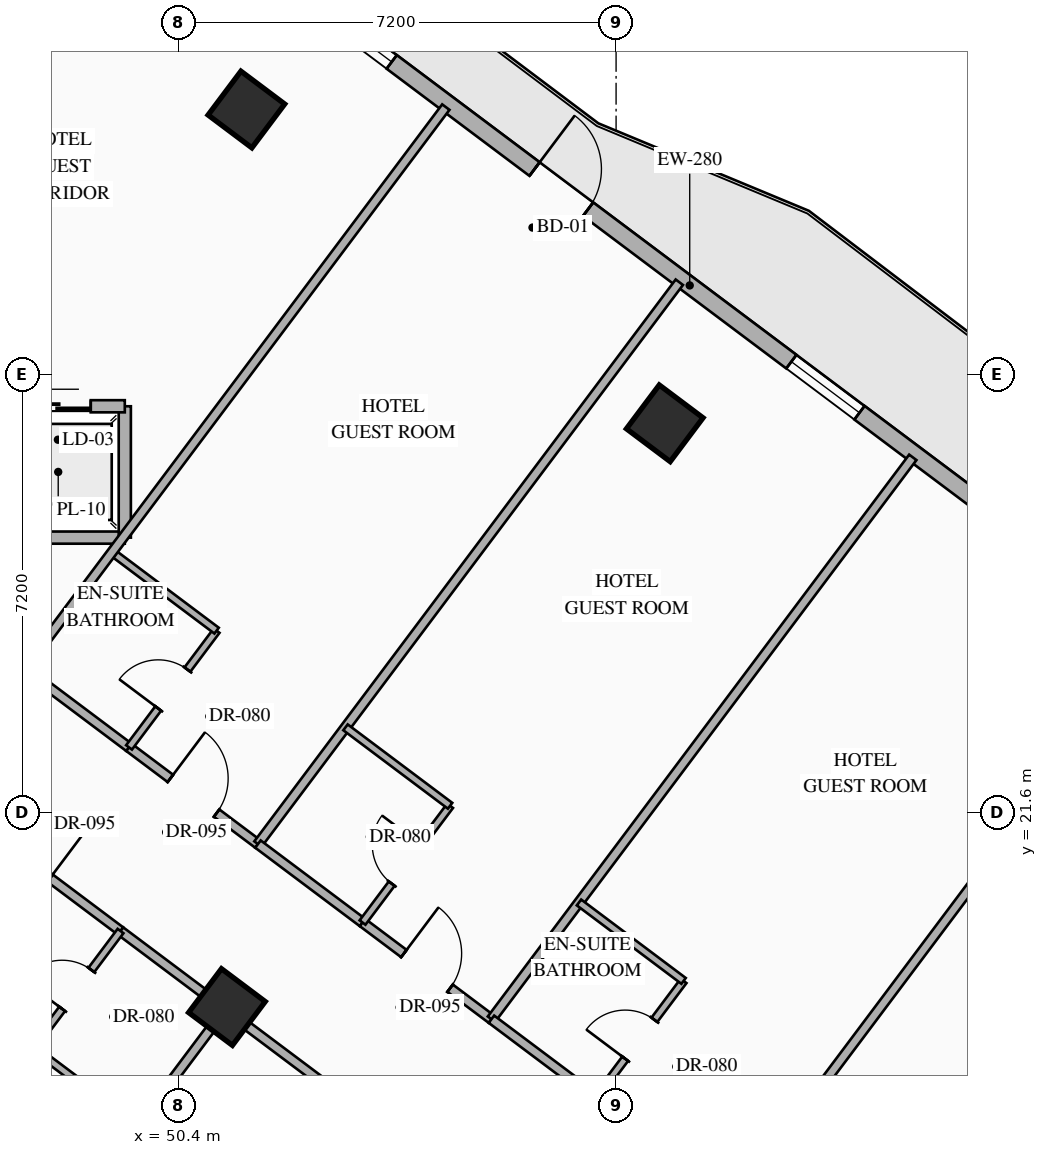
"""IFC4 building model, lengths in metres.
Left out: names, types, materials, properties, quantities, classifications, styles, units other than length and angle.
Written with IfcOpenShell. Run it as: python <this file> out.ifc"""

import sys

from ifc_helpers import new_model, si_unit, direction, frame, frame_2d, origin, origin_2d, place, context, subcontext, project, spatial, rectangle, hollow_rectangle, extrude, element, fill, save


model = new_model("IFC4")
c1 = context("Model", 3, precision=1e-05, world=origin(), true_north=direction((0.0, 1.0)))
c2 = subcontext(c1, "Body", "Model", "MODEL_VIEW")
j1 = project(units=[si_unit("LENGTHUNIT", "METRE"), si_unit("PLANEANGLEUNIT", "RADIAN")], contexts=[c1])
p1 = place(None, origin())
s1 = spatial("IfcSite", under=j1, at=p1, CompositionType="ELEMENT")
p2 = place(p1, origin())
s2 = spatial("IfcBuilding", under=s1, at=p2, CompositionType="ELEMENT")
p3 = place(p2, frame((0.0, 0.0, 81.3)))
s3 = spatial("IfcBuildingStorey", under=s2, at=p3, CompositionType="ELEMENT", Elevation=81.3)
for number, where, z_axis, x_axis in (
    (1, (51.52, 33.16, 0.0), (0.0, 0.0, 1.0), (0.8, -0.6, 0.0)),
    (2, (58.4, 28.0, 0.0), (0.0, 0.0, 1.0), (0.8, -0.6, 0.0)),
    (3, (51.2, 18.4, 0.0), (0.0, 0.0, 1.0), (0.8, -0.6, 0.0)),
):
    element("IfcColumn", number, at=place(p3, frame(where, z_axis=z_axis, x_axis=x_axis)), inside=s3, PredefinedType="COLUMN", context=c2, shape_type="SweptSolid", body=[
        extrude(hollow_rectangle(XDim=0.9, YDim=0.9, WallThickness=0.036, at=origin_2d()), origin(), (0.0, 0.0, 1.0), 3.35),
    ])
p4 = place(p3, frame((44.86, 40.73, 0.0), z_axis=(0.0, 0.0, 1.0), x_axis=(0.800006902154, -0.599990797017, 0.0)))
e4 = element("IfcWall", 4, at=p4, inside=s3, PredefinedType="STANDARD", context=c2, shape_type="SweptSolid", body=[
    extrude(rectangle(XDim=29.712, YDim=0.28, at=frame_2d((14.856, 0.0))), origin(), (0.0, 0.0, 1.0), 3.13),
])
p5 = place(p4, frame((14.249, 0.0, 0.0)))
e5 = element("IfcOpeningElement", 5, at=p5, cuts=e4, PredefinedType="OPENING", context=c2, shape_type="SweptSolid", body=[
    extrude(rectangle(XDim=1.1, YDim=2.2, at=frame_2d((0.55, 1.1))), frame((0.0, 0.15, 0.0), z_axis=(0.0, -1.0, 0.0), x_axis=(1.0, 0.0, 0.0)), (0.0, 0.0, 1.0), 0.3),
])
p6 = place(p4, frame((1.612, 0.0, 0.85)))
e6 = element("IfcOpeningElement", 6, at=p6, cuts=e4, PredefinedType="OPENING", context=c2, shape_type="SweptSolid", body=[
    extrude(rectangle(XDim=1.4, YDim=1.8, at=frame_2d((0.7, 0.9))), frame((0.0, 0.15, 0.0), z_axis=(0.0, -1.0, 0.0), x_axis=(1.0, 0.0, 0.0)), (0.0, 0.0, 1.0), 0.3),
])
p7 = place(p4, frame((5.667, 0.0, 0.85)))
e7 = element("IfcOpeningElement", 7, at=p7, cuts=e4, PredefinedType="OPENING", context=c2, shape_type="SweptSolid", body=[
    extrude(rectangle(XDim=1.4, YDim=1.8, at=frame_2d((0.7, 0.9))), frame((0.0, 0.15, 0.0), z_axis=(0.0, -1.0, 0.0), x_axis=(1.0, 0.0, 0.0)), (0.0, 0.0, 1.0), 0.3),
])
p8 = place(p4, frame((9.912, 0.0, 0.85)))
e8 = element("IfcOpeningElement", 8, at=p8, cuts=e4, PredefinedType="OPENING", context=c2, shape_type="SweptSolid", body=[
    extrude(rectangle(XDim=1.4, YDim=1.8, at=frame_2d((0.7, 0.9))), frame((0.0, 0.15, 0.0), z_axis=(0.0, -1.0, 0.0), x_axis=(1.0, 0.0, 0.0)), (0.0, 0.0, 1.0), 0.3),
])
p9 = place(p4, frame((19.528, 0.0, 0.85)))
e9 = element("IfcOpeningElement", 9, at=p9, cuts=e4, PredefinedType="OPENING", context=c2, shape_type="SweptSolid", body=[
    extrude(rectangle(XDim=1.4, YDim=1.8, at=frame_2d((0.7, 0.9))), frame((0.0, 0.15, 0.0), z_axis=(0.0, -1.0, 0.0), x_axis=(1.0, 0.0, 0.0)), (0.0, 0.0, 1.0), 0.3),
])
p10 = place(p4, frame((23.451, 0.0, 0.85)))
e10 = element("IfcOpeningElement", 10, at=p10, cuts=e4, PredefinedType="OPENING", context=c2, shape_type="SweptSolid", body=[
    extrude(rectangle(XDim=1.4, YDim=1.8, at=frame_2d((0.7, 0.9))), frame((0.0, 0.15, 0.0), z_axis=(0.0, -1.0, 0.0), x_axis=(1.0, 0.0, 0.0)), (0.0, 0.0, 1.0), 0.3),
])
p11 = place(p4, frame((27.852, 0.0, 0.85)))
e11 = element("IfcOpeningElement", 11, at=p11, cuts=e4, PredefinedType="OPENING", context=c2, shape_type="SweptSolid", body=[
    extrude(rectangle(XDim=1.4, YDim=1.8, at=frame_2d((0.7, 0.9))), frame((0.0, 0.15, 0.0), z_axis=(0.0, -1.0, 0.0), x_axis=(1.0, 0.0, 0.0)), (0.0, 0.0, 1.0), 0.3),
])
p12 = place(p3, frame((53.318, 2.487, 0.0), z_axis=(0.0, 0.0, 1.0), x_axis=(-0.800004174678, 0.599994433723, 0.0)))
e12 = element("IfcWall", 12, at=p12, inside=s3, PredefinedType="STANDARD", context=c2, shape_type="SweptSolid", body=[
    extrude(rectangle(XDim=35.089, YDim=0.28, at=frame_2d((17.544, 0.0))), origin(), (0.0, 0.0, 1.0), 3.13),
])
p13 = place(p12, frame((1.931, 0.0, 0.85)))
e13 = element("IfcOpeningElement", 13, at=p13, cuts=e12, PredefinedType="OPENING", context=c2, shape_type="SweptSolid", body=[
    extrude(rectangle(XDim=1.4, YDim=1.8, at=frame_2d((0.7, 0.9))), frame((0.0, 0.15, 0.0), z_axis=(0.0, -1.0, 0.0), x_axis=(1.0, 0.0, 0.0)), (0.0, 0.0, 1.0), 0.3),
])
p14 = place(p12, frame((6.819, 0.0, 0.85)))
e14 = element("IfcOpeningElement", 14, at=p14, cuts=e12, PredefinedType="OPENING", context=c2, shape_type="SweptSolid", body=[
    extrude(rectangle(XDim=1.4, YDim=1.8, at=frame_2d((0.7, 0.9))), frame((0.0, 0.15, 0.0), z_axis=(0.0, -1.0, 0.0), x_axis=(1.0, 0.0, 0.0)), (0.0, 0.0, 1.0), 0.3),
])
p15 = place(p12, frame((11.832, 0.0, 0.85)))
e15 = element("IfcOpeningElement", 15, at=p15, cuts=e12, PredefinedType="OPENING", context=c2, shape_type="SweptSolid", body=[
    extrude(rectangle(XDim=1.4, YDim=1.8, at=frame_2d((0.7, 0.9))), frame((0.0, 0.15, 0.0), z_axis=(0.0, -1.0, 0.0), x_axis=(1.0, 0.0, 0.0)), (0.0, 0.0, 1.0), 0.3),
])
p16 = place(p12, frame((17.647, 0.0, 0.85)))
e16 = element("IfcOpeningElement", 16, at=p16, cuts=e12, PredefinedType="OPENING", context=c2, shape_type="SweptSolid", body=[
    extrude(rectangle(XDim=1.4, YDim=1.8, at=frame_2d((0.7, 0.9))), frame((0.0, 0.15, 0.0), z_axis=(0.0, -1.0, 0.0), x_axis=(1.0, 0.0, 0.0)), (0.0, 0.0, 1.0), 0.3),
])
p17 = place(p12, frame((21.857, 0.0, 0.85)))
e17 = element("IfcOpeningElement", 17, at=p17, cuts=e12, PredefinedType="OPENING", context=c2, shape_type="SweptSolid", body=[
    extrude(rectangle(XDim=1.4, YDim=1.8, at=frame_2d((0.7, 0.9))), frame((0.0, 0.15, 0.0), z_axis=(0.0, -1.0, 0.0), x_axis=(1.0, 0.0, 0.0)), (0.0, 0.0, 1.0), 0.3),
])
p18 = place(p12, frame((26.87, 0.0, 0.85)))
e18 = element("IfcOpeningElement", 18, at=p18, cuts=e12, PredefinedType="OPENING", context=c2, shape_type="SweptSolid", body=[
    extrude(rectangle(XDim=1.4, YDim=1.8, at=frame_2d((0.7, 0.9))), frame((0.0, 0.15, 0.0), z_axis=(0.0, -1.0, 0.0), x_axis=(1.0, 0.0, 0.0)), (0.0, 0.0, 1.0), 0.3),
])
p19 = place(p12, frame((31.757, 0.0, 0.85)))
e19 = element("IfcOpeningElement", 19, at=p19, cuts=e12, PredefinedType="OPENING", context=c2, shape_type="SweptSolid", body=[
    extrude(rectangle(XDim=1.4, YDim=1.8, at=frame_2d((0.7, 0.9))), frame((0.0, 0.15, 0.0), z_axis=(0.0, -1.0, 0.0), x_axis=(1.0, 0.0, 0.0)), (0.0, 0.0, 1.0), 0.3),
])
p20 = place(p3, frame((45.12, 26.12, 0.0), z_axis=(0.0, 0.0, 1.0), x_axis=(1.0, 0.0, 0.0)))
e20 = element("IfcWall", 20, at=p20, inside=s3, PredefinedType="STANDARD", context=c2, shape_type="SweptSolid", body=[
    extrude(rectangle(XDim=4.4, YDim=0.2, at=frame_2d((2.2, 0.0))), origin(), (0.0, 0.0, 1.0), 3.13),
])
p21 = place(p3, frame((49.52, 26.12, 0.0), z_axis=(0.0, 0.0, 1.0), x_axis=(0.0, 1.0, 0.0)))
e21 = element("IfcWall", 21, at=p21, inside=s3, PredefinedType="STANDARD", context=c2, shape_type="SweptSolid", body=[
    extrude(rectangle(XDim=2.16, YDim=0.2, at=frame_2d((1.08, 0.0))), origin(), (0.0, 0.0, 1.0), 3.13),
])
p22 = place(p3, frame((45.12, 28.28, 0.0), z_axis=(0.0, 0.0, 1.0), x_axis=(1.0, 0.0, 0.0)))
e22 = element("IfcWall", 22, at=p22, inside=s3, PredefinedType="STANDARD", context=c2, shape_type="SweptSolid", body=[
    extrude(rectangle(XDim=4.4, YDim=0.2, at=frame_2d((2.2, 0.0))), origin(), (0.0, 0.0, 1.0), 3.13),
])
p23 = place(p22, frame((0.56, 0.0, 0.0)))
e23 = element("IfcOpeningElement", 23, at=p23, cuts=e22, PredefinedType="OPENING", context=c2, shape_type="SweptSolid", body=[
    extrude(rectangle(XDim=1.08, YDim=2.15, at=frame_2d((0.54, 1.075))), frame((0.0, 0.11, 0.0), z_axis=(0.0, -1.0, 0.0), x_axis=(1.0, 0.0, 0.0)), (0.0, 0.0, 1.0), 0.22),
])
p24 = place(p22, frame((2.76, 0.0, 0.0)))
e24 = element("IfcOpeningElement", 24, at=p24, cuts=e22, PredefinedType="OPENING", context=c2, shape_type="SweptSolid", body=[
    extrude(rectangle(XDim=1.08, YDim=2.15, at=frame_2d((0.54, 1.075))), frame((0.0, 0.11, 0.0), z_axis=(0.0, -1.0, 0.0), x_axis=(1.0, 0.0, 0.0)), (0.0, 0.0, 1.0), 0.22),
])
p25 = place(p3, frame((47.87, 23.96, 0.0), z_axis=(0.0, 0.0, 1.0), x_axis=(0.79998637334, -0.60001816845, 0.0)))
e25 = element("IfcWall", 25, at=p25, inside=s3, PredefinedType="PARTITIONING", context=c2, shape_type="SweptSolid", body=[
    extrude(rectangle(XDim=2.15, YDim=0.15, at=frame_2d((1.075, 0.0))), origin(), (0.0, 0.0, 1.0), 2.775),
])
p26 = place(p3, frame((49.59, 22.67, 0.0), z_axis=(0.0, 0.0, 1.0), x_axis=(0.800011056104, -0.599985258246, 0.0)))
e26 = element("IfcWall", 26, at=p26, inside=s3, PredefinedType="PARTITIONING", context=c2, shape_type="SweptSolid", body=[
    extrude(rectangle(XDim=2.65, YDim=0.15, at=frame_2d((1.325, 0.0))), origin(), (0.0, 0.0, 1.0), 2.775),
])
p27 = place(p26, frame((0.85, 0.0, 0.0)))
e27 = element("IfcOpeningElement", 27, at=p27, cuts=e26, PredefinedType="OPENING", context=c2, shape_type="SweptSolid", body=[
    extrude(rectangle(XDim=0.95, YDim=2.15, at=frame_2d((0.475, 1.075))), frame((0.0, 0.085, 0.0), z_axis=(0.0, -1.0, 0.0), x_axis=(1.0, 0.0, 0.0)), (0.0, 0.0, 1.0), 0.17),
])
p28 = place(p3, frame((49.59, 22.67, 0.0), z_axis=(0.0, 0.0, 1.0), x_axis=(0.599951172744, 0.800036618114, 0.0)))
e28 = element("IfcWall", 28, at=p28, inside=s3, PredefinedType="PARTITIONING", context=c2, shape_type="SweptSolid", body=[
    extrude(rectangle(XDim=2.4, YDim=0.12, at=frame_2d((1.2, 0.0))), origin(), (0.0, 0.0, 1.0), 3.13),
])
p29 = place(p28, frame((0.8, 0.0, 0.0)))
e29 = element("IfcOpeningElement", 29, at=p29, cuts=e28, PredefinedType="OPENING", context=c2, shape_type="SweptSolid", body=[
    extrude(rectangle(XDim=0.8, YDim=2.06, at=frame_2d((0.4, 1.03))), frame((0.0, 0.07, 0.0), z_axis=(0.0, -1.0, 0.0), x_axis=(1.0, 0.0, 0.0)), (0.0, 0.0, 1.0), 0.14),
])
p30 = place(p3, frame((49.31, 25.88, 0.0), z_axis=(0.0, 0.0, 1.0), x_axis=(0.800040880289, -0.59994548908, 0.0)))
e30 = element("IfcWall", 30, at=p30, inside=s3, PredefinedType="PARTITIONING", context=c2, shape_type="SweptSolid", body=[
    extrude(rectangle(XDim=2.15, YDim=0.12, at=frame_2d((1.075, 0.0))), origin(), (0.0, 0.0, 1.0), 3.13),
])
for number, where, z_axis, x_axis in (
    (31, (47.87, 23.96, 0.0), (0.0, 0.0, 1.0), (0.6, 0.8, 0.0)),
    (32, (51.71, 21.08, 0.0), (0.0, 0.0, 1.0), (0.6, 0.8, 0.0)),
):
    element("IfcWall", number, at=place(p3, frame(where, z_axis=z_axis, x_axis=x_axis)), inside=s3, PredefinedType="PARTITIONING", context=c2, shape_type="SweptSolid", body=[
        extrude(rectangle(XDim=11.55, YDim=0.15, at=frame_2d((5.775, 0.0))), origin(), (0.0, 0.0, 1.0), 3.13),
    ])
p31 = place(p3, frame((51.71, 21.08, 0.0), z_axis=(0.0, 0.0, 1.0), x_axis=(0.79998637334, -0.60001816845, 0.0)))
e33 = element("IfcWall", 33, at=p31, inside=s3, PredefinedType="PARTITIONING", context=c2, shape_type="SweptSolid", body=[
    extrude(rectangle(XDim=2.15, YDim=0.15, at=frame_2d((1.075, 0.0))), origin(), (0.0, 0.0, 1.0), 2.775),
])
p32 = place(p3, frame((53.43, 19.79, 0.0), z_axis=(0.0, 0.0, 1.0), x_axis=(0.8, -0.6, 0.0)))
e34 = element("IfcWall", 34, at=p32, inside=s3, PredefinedType="PARTITIONING", context=c2, shape_type="SweptSolid", body=[
    extrude(rectangle(XDim=2.65, YDim=0.15, at=frame_2d((1.325, 0.0))), origin(), (0.0, 0.0, 1.0), 2.775),
])
p33 = place(p32, frame((0.85, 0.0, 0.0)))
e35 = element("IfcOpeningElement", 35, at=p33, cuts=e34, PredefinedType="OPENING", context=c2, shape_type="SweptSolid", body=[
    extrude(rectangle(XDim=0.95, YDim=2.15, at=frame_2d((0.475, 1.075))), frame((0.0, 0.085, 0.0), z_axis=(0.0, -1.0, 0.0), x_axis=(1.0, 0.0, 0.0)), (0.0, 0.0, 1.0), 0.17),
])
p34 = place(p3, frame((53.43, 19.79, 0.0), z_axis=(0.0, 0.0, 1.0), x_axis=(0.600065100855, 0.79995117022, 0.0)))
e36 = element("IfcWall", 36, at=p34, inside=s3, PredefinedType="PARTITIONING", context=c2, shape_type="SweptSolid", body=[
    extrude(rectangle(XDim=2.4, YDim=0.12, at=frame_2d((1.2, 0.0))), origin(), (0.0, 0.0, 1.0), 3.13),
])
p35 = place(p34, frame((0.8, 0.0, 0.0)))
e37 = element("IfcOpeningElement", 37, at=p35, cuts=e36, PredefinedType="OPENING", context=c2, shape_type="SweptSolid", body=[
    extrude(rectangle(XDim=0.8, YDim=2.06, at=frame_2d((0.4, 1.03))), frame((0.0, 0.07, 0.0), z_axis=(0.0, -1.0, 0.0), x_axis=(1.0, 0.0, 0.0)), (0.0, 0.0, 1.0), 0.14),
])
p36 = place(p3, frame((53.15, 23.0, 0.0), z_axis=(0.0, 0.0, 1.0), x_axis=(0.800027249606, -0.599963665473, 0.0)))
e38 = element("IfcWall", 38, at=p36, inside=s3, PredefinedType="PARTITIONING", context=c2, shape_type="SweptSolid", body=[
    extrude(rectangle(XDim=2.15, YDim=0.12, at=frame_2d((1.075, 0.0))), origin(), (0.0, 0.0, 1.0), 3.13),
])
p37 = place(p3, frame((55.55, 18.2, 0.0), z_axis=(0.0, 0.0, 1.0), x_axis=(0.599996617946, 0.80000253653, 0.0)))
e39 = element("IfcWall", 39, at=p37, inside=s3, PredefinedType="PARTITIONING", context=c2, shape_type="SweptSolid", body=[
    extrude(rectangle(XDim=11.55, YDim=0.15, at=frame_2d((5.775, 0.0))), origin(), (0.0, 0.0, 1.0), 3.13),
])
p38 = place(p3, frame((55.55, 18.2, 0.0), z_axis=(0.0, 0.0, 1.0), x_axis=(0.79998637334, -0.60001816845, 0.0)))
e40 = element("IfcWall", 40, at=p38, inside=s3, PredefinedType="PARTITIONING", context=c2, shape_type="SweptSolid", body=[
    extrude(rectangle(XDim=2.15, YDim=0.15, at=frame_2d((1.075, 0.0))), origin(), (0.0, 0.0, 1.0), 2.775),
])
p39 = place(p3, frame((57.27, 16.91, 0.0), z_axis=(0.0, 0.0, 1.0), x_axis=(0.599951172744, 0.800036618114, 0.0)))
e41 = element("IfcWall", 41, at=p39, inside=s3, PredefinedType="PARTITIONING", context=c2, shape_type="SweptSolid", body=[
    extrude(rectangle(XDim=2.4, YDim=0.12, at=frame_2d((1.2, 0.0))), origin(), (0.0, 0.0, 1.0), 3.13),
])
p40 = place(p39, frame((0.8, 0.0, 0.0)))
e42 = element("IfcOpeningElement", 42, at=p40, cuts=e41, PredefinedType="OPENING", context=c2, shape_type="SweptSolid", body=[
    extrude(rectangle(XDim=0.8, YDim=2.06, at=frame_2d((0.4, 1.03))), frame((0.0, 0.07, 0.0), z_axis=(0.0, -1.0, 0.0), x_axis=(1.0, 0.0, 0.0)), (0.0, 0.0, 1.0), 0.14),
])
p41 = place(p3, frame((56.99, 20.12, 0.0), z_axis=(0.0, 0.0, 1.0), x_axis=(0.79998637334, -0.60001816845, 0.0)))
e43 = element("IfcWall", 43, at=p41, inside=s3, PredefinedType="PARTITIONING", context=c2, shape_type="SweptSolid", body=[
    extrude(rectangle(XDim=2.15, YDim=0.12, at=frame_2d((1.075, 0.0))), origin(), (0.0, 0.0, 1.0), 3.13),
])
p42 = place(p3, frame((59.55, 15.2, 0.0), z_axis=(0.0, 0.0, 1.0), x_axis=(0.599996617946, 0.80000253653, 0.0)))
e44 = element("IfcWall", 44, at=p42, inside=s3, PredefinedType="PARTITIONING", context=c2, shape_type="SweptSolid", body=[
    extrude(rectangle(XDim=11.55, YDim=0.15, at=frame_2d((5.775, 0.0))), origin(), (0.0, 0.0, 1.0), 3.13),
])
p43 = place(p3, frame((46.37, 21.96, 0.0), z_axis=(0.0, 0.0, 1.0), x_axis=(0.799977170108, -0.600030438649, 0.0)))
e45 = element("IfcWall", 45, at=p43, inside=s3, PredefinedType="PARTITIONING", context=c2, shape_type="SweptSolid", body=[
    extrude(rectangle(XDim=3.85, YDim=0.15, at=frame_2d((1.925, 0.0))), origin(), (0.0, 0.0, 1.0), 2.425),
])
p44 = place(p43, frame((1.45, 0.0, 0.0)))
e46 = element("IfcOpeningElement", 46, at=p44, cuts=e45, PredefinedType="OPENING", context=c2, shape_type="SweptSolid", body=[
    extrude(rectangle(XDim=0.95, YDim=2.15, at=frame_2d((0.475, 1.075))), frame((0.0, 0.085, 0.0), z_axis=(0.0, -1.0, 0.0), x_axis=(1.0, 0.0, 0.0)), (0.0, 0.0, 1.0), 0.17),
])
p45 = place(p3, frame((49.45, 19.65, 0.0), z_axis=(0.0, 0.0, 1.0), x_axis=(0.800040880289, -0.59994548908, 0.0)))
e47 = element("IfcWall", 47, at=p45, inside=s3, PredefinedType="PARTITIONING", context=c2, shape_type="SweptSolid", body=[
    extrude(rectangle(XDim=2.15, YDim=0.15, at=frame_2d((1.075, 0.0))), origin(), (0.0, 0.0, 1.0), 2.425),
])
p46 = place(p3, frame((48.01, 17.73, 0.0), z_axis=(0.0, 0.0, 1.0), x_axis=(0.6, 0.8, 0.0)))
e48 = element("IfcWall", 48, at=p46, inside=s3, PredefinedType="PARTITIONING", context=c2, shape_type="SweptSolid", body=[
    extrude(rectangle(XDim=2.4, YDim=0.12, at=frame_2d((1.2, 0.0))), origin(), (0.0, 0.0, 1.0), 3.13),
])
p47 = place(p46, frame((0.8, 0.0, 0.0)))
e49 = element("IfcOpeningElement", 49, at=p47, cuts=e48, PredefinedType="OPENING", context=c2, shape_type="SweptSolid", body=[
    extrude(rectangle(XDim=0.8, YDim=2.06, at=frame_2d((0.4, 1.03))), frame((0.0, 0.07, 0.0), z_axis=(0.0, -1.0, 0.0), x_axis=(1.0, 0.0, 0.0)), (0.0, 0.0, 1.0), 0.14),
])
p48 = place(p3, frame((48.01, 17.73, 0.0), z_axis=(0.0, 0.0, 1.0), x_axis=(0.79998637334, -0.60001816845, 0.0)))
e50 = element("IfcWall", 50, at=p48, inside=s3, PredefinedType="PARTITIONING", context=c2, shape_type="SweptSolid", body=[
    extrude(rectangle(XDim=2.15, YDim=0.12, at=frame_2d((1.075, 0.0))), origin(), (0.0, 0.0, 1.0), 3.13),
])
p49 = place(p3, frame((44.36, 9.28, 0.0), z_axis=(0.0, 0.0, 1.0), x_axis=(0.599986233332, 0.800010324816, 0.0)))
e51 = element("IfcWall", 51, at=p49, inside=s3, PredefinedType="PARTITIONING", context=c2, shape_type="SweptSolid", body=[
    extrude(rectangle(XDim=11.35, YDim=0.15, at=frame_2d((5.675, 0.0))), origin(), (0.0, 0.0, 1.0), 2.425),
])
p50 = place(p3, frame((51.17, 18.36, 0.0), z_axis=(0.0, 0.0, 1.0), x_axis=(0.79998637334, -0.60001816845, 0.0)))
e52 = element("IfcWall", 52, at=p50, inside=s3, PredefinedType="PARTITIONING", context=c2, shape_type="SweptSolid", body=[
    extrude(rectangle(XDim=2.15, YDim=0.15, at=frame_2d((1.075, 0.0))), origin(), (0.0, 0.0, 1.0), 2.425),
])
p51 = place(p5, origin())
e53 = element("IfcDoor", 53, at=p51, inside=s3, OperationType="SINGLE_SWING_LEFT", PredefinedType="DOOR", context=c2, shape_type="SweptSolid", body=[
    extrude(rectangle(XDim=1.1, YDim=2.2, at=frame_2d((0.55, 1.1))), frame((0.0, 0.025, 0.0), z_axis=(0.0, -1.0, 0.0), x_axis=(1.0, 0.0, 0.0)), (0.0, 0.0, 1.0), 0.05),
])
fill(e5, e53)
p52 = place(p8, origin())
e54 = element("IfcWindow", 54, at=p52, inside=s3, PartitioningType="SINGLE_PANEL", PredefinedType="WINDOW", context=c2, shape_type="SweptSolid", body=[
    extrude(rectangle(XDim=1.4, YDim=1.8, at=frame_2d((0.7, 0.9))), frame((0.0, 0.03, 0.0), z_axis=(0.0, -1.0, 0.0), x_axis=(1.0, 0.0, 0.0)), (0.0, 0.0, 1.0), 0.06),
])
fill(e8, e54)
p53 = place(p9, origin())
e55 = element("IfcWindow", 55, at=p53, inside=s3, PartitioningType="SINGLE_PANEL", PredefinedType="WINDOW", context=c2, shape_type="SweptSolid", body=[
    extrude(rectangle(XDim=1.4, YDim=1.8, at=frame_2d((0.7, 0.9))), frame((0.0, 0.03, 0.0), z_axis=(0.0, -1.0, 0.0), x_axis=(1.0, 0.0, 0.0)), (0.0, 0.0, 1.0), 0.06),
])
fill(e9, e55)
p54 = place(p24, origin())
e56 = element("IfcDoor", 56, at=p54, inside=s3, OperationType="SLIDING_TO_LEFT", PredefinedType="USERDEFINED", context=c2, shape_type="SweptSolid", body=[
    extrude(rectangle(XDim=1.08, YDim=2.15, at=frame_2d((0.54, 1.075))), frame((0.0, 0.025, 0.0), z_axis=(0.0, -1.0, 0.0), x_axis=(1.0, 0.0, 0.0)), (0.0, 0.0, 1.0), 0.05),
])
fill(e24, e56)
p55 = place(p27, origin())
e57 = element("IfcDoor", 57, at=p55, inside=s3, OperationType="SINGLE_SWING_LEFT", PredefinedType="DOOR", context=c2, shape_type="SweptSolid", body=[
    extrude(rectangle(XDim=0.95, YDim=2.15, at=frame_2d((0.475, 1.075))), frame((0.0, 0.025, 0.0), z_axis=(0.0, -1.0, 0.0), x_axis=(1.0, 0.0, 0.0)), (0.0, 0.0, 1.0), 0.05),
])
fill(e27, e57)
p56 = place(p29, origin())
e58 = element("IfcDoor", 58, at=p56, inside=s3, OperationType="SINGLE_SWING_LEFT", PredefinedType="DOOR", context=c2, shape_type="SweptSolid", body=[
    extrude(rectangle(XDim=0.8, YDim=2.06, at=frame_2d((0.4, 1.03))), frame((0.0, 0.025, 0.0), z_axis=(0.0, -1.0, 0.0), x_axis=(1.0, 0.0, 0.0)), (0.0, 0.0, 1.0), 0.05),
])
fill(e29, e58)
p57 = place(p33, origin())
e59 = element("IfcDoor", 59, at=p57, inside=s3, OperationType="SINGLE_SWING_LEFT", PredefinedType="DOOR", context=c2, shape_type="SweptSolid", body=[
    extrude(rectangle(XDim=0.95, YDim=2.15, at=frame_2d((0.475, 1.075))), frame((0.0, 0.025, 0.0), z_axis=(0.0, -1.0, 0.0), x_axis=(1.0, 0.0, 0.0)), (0.0, 0.0, 1.0), 0.05),
])
fill(e35, e59)
p58 = place(p35, origin())
e60 = element("IfcDoor", 60, at=p58, inside=s3, OperationType="SINGLE_SWING_RIGHT", PredefinedType="DOOR", context=c2, shape_type="SweptSolid", body=[
    extrude(rectangle(XDim=0.8, YDim=2.06, at=frame_2d((0.4, 1.03))), frame((0.0, 0.025, 0.0), z_axis=(0.0, -1.0, 0.0), x_axis=(1.0, 0.0, 0.0)), (0.0, 0.0, 1.0), 0.05),
])
fill(e37, e60)
p59 = place(p40, origin())
e61 = element("IfcDoor", 61, at=p59, inside=s3, OperationType="SINGLE_SWING_LEFT", PredefinedType="DOOR", context=c2, shape_type="SweptSolid", body=[
    extrude(rectangle(XDim=0.8, YDim=2.06, at=frame_2d((0.4, 1.03))), frame((0.0, 0.025, 0.0), z_axis=(0.0, -1.0, 0.0), x_axis=(1.0, 0.0, 0.0)), (0.0, 0.0, 1.0), 0.05),
])
fill(e42, e61)
p60 = place(p47, origin())
e62 = element("IfcDoor", 62, at=p60, inside=s3, OperationType="SINGLE_SWING_LEFT", PredefinedType="DOOR", context=c2, shape_type="SweptSolid", body=[
    extrude(rectangle(XDim=0.8, YDim=2.06, at=frame_2d((0.4, 1.03))), frame((0.0, 0.025, 0.0), z_axis=(0.0, -1.0, 0.0), x_axis=(1.0, 0.0, 0.0)), (0.0, 0.0, 1.0), 0.05),
])
fill(e49, e62)
save(model, sys.argv[1])
